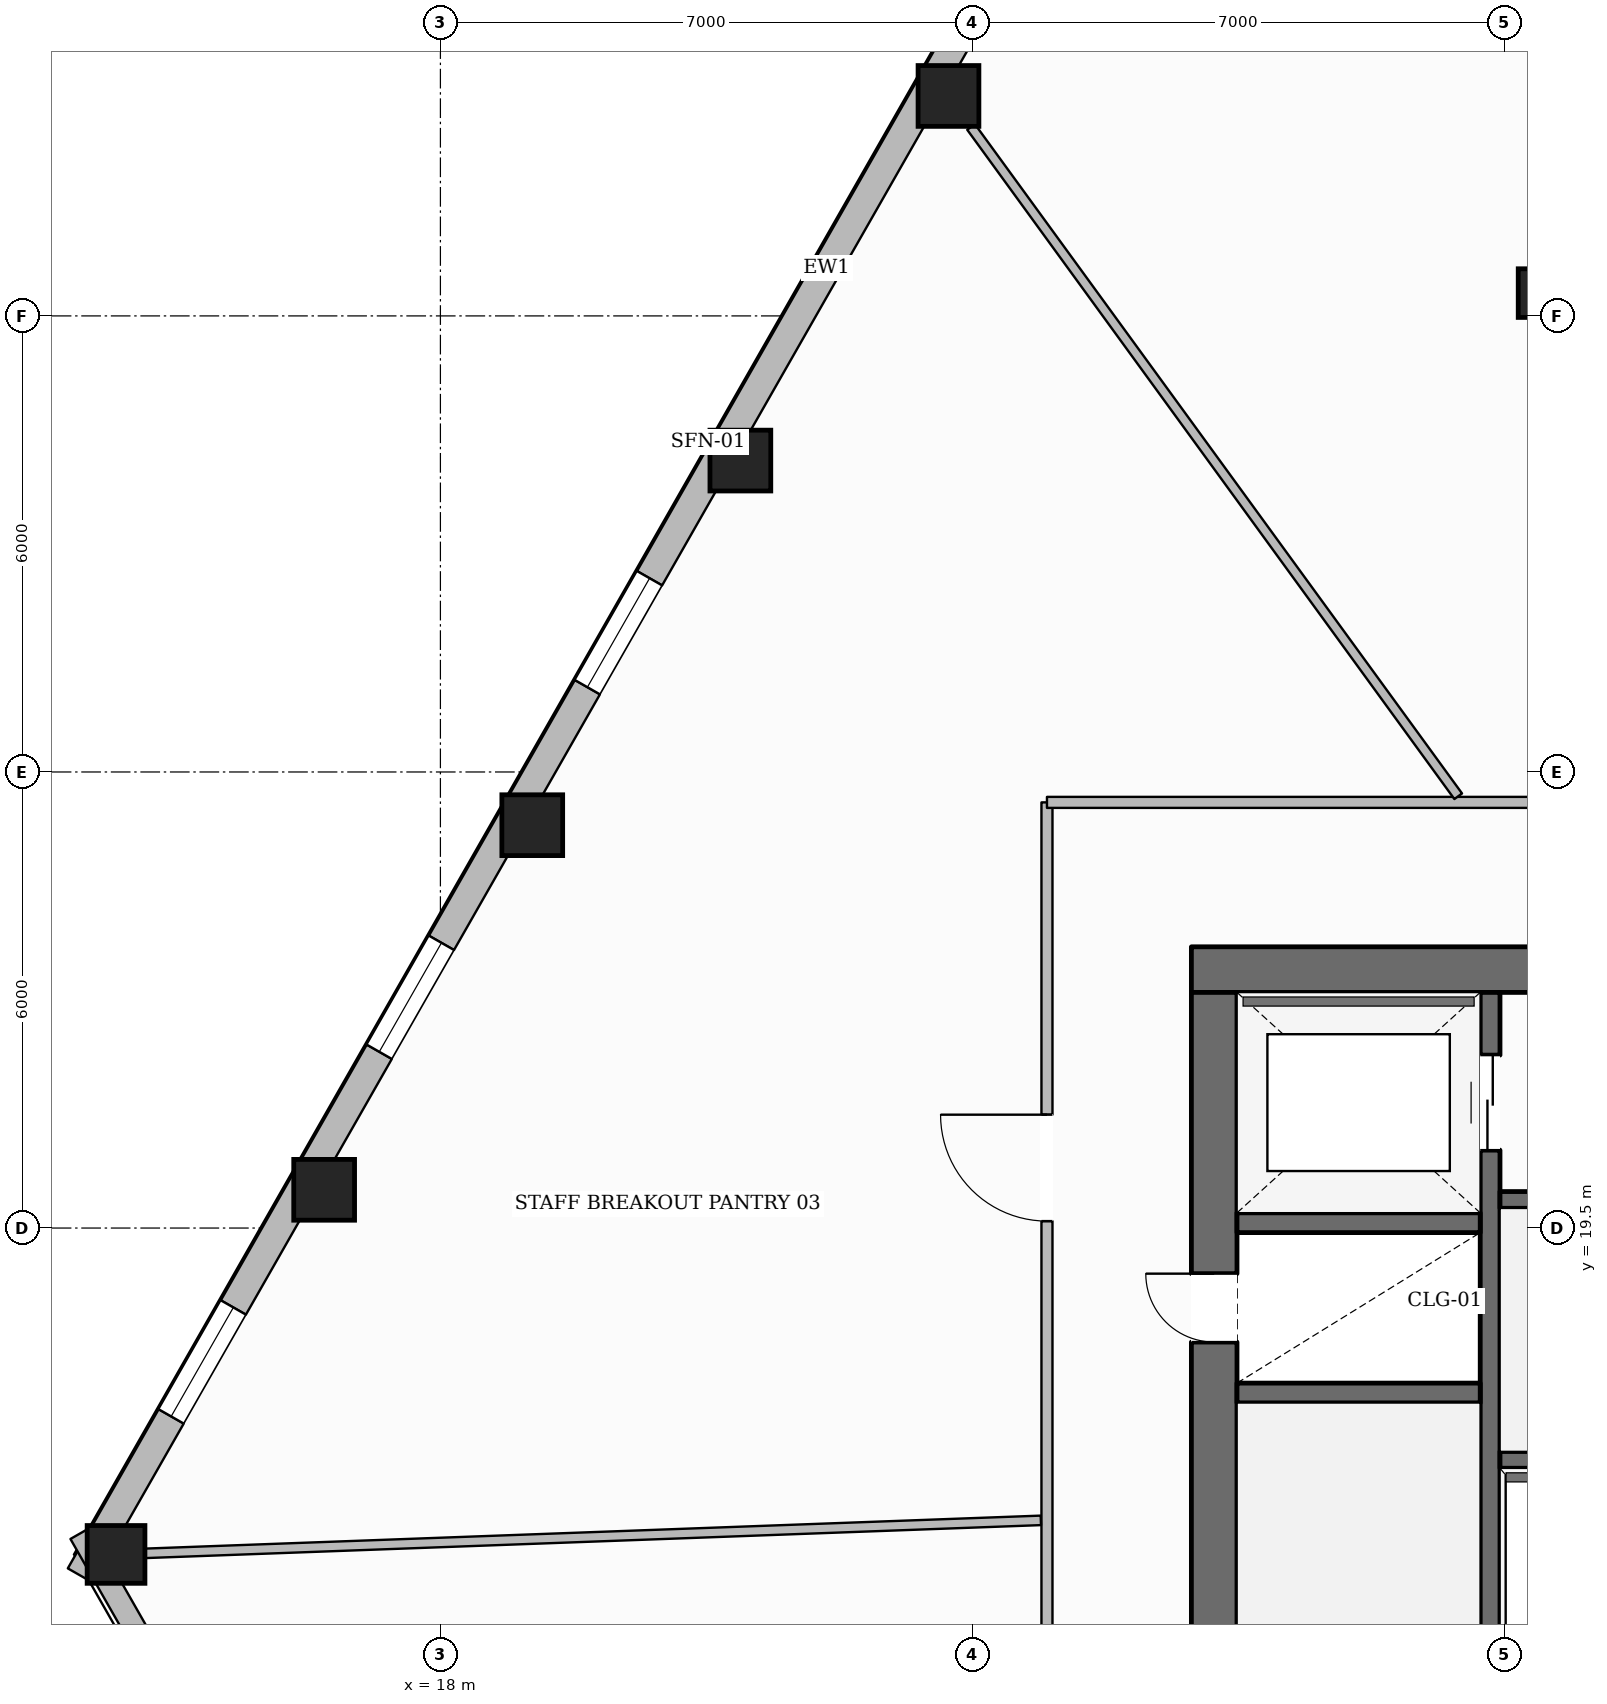
"""IFC4 building model, lengths in metres.
Left out: names, types, materials, properties, quantities, classifications, styles, units other than length and angle.
Written with IfcOpenShell. Run it as: python <this file> out.ifc"""

import sys

from ifc_helpers import new_model, si_unit, direction, frame, frame_2d, origin, origin_2d, place, context, subcontext, project, spatial, rectangle, hollow_rectangle, extrude, element, fill, save


model = new_model("IFC4")
c1 = context("Model", 3, precision=1e-05, world=origin(), true_north=direction((0.0, 1.0)))
c2 = subcontext(c1, "Body", "Model", "MODEL_VIEW")
j1 = project(units=[si_unit("LENGTHUNIT", "METRE"), si_unit("PLANEANGLEUNIT", "RADIAN")], contexts=[c1])
p1 = place(None, origin())
s1 = spatial("IfcSite", under=j1, at=p1, CompositionType="ELEMENT")
p2 = place(p1, origin())
s2 = spatial("IfcBuilding", under=s1, at=p2, CompositionType="ELEMENT")
p3 = place(p2, frame((0.0, 0.0, 25.25)))
s3 = spatial("IfcBuildingStorey", under=s2, at=p3, CompositionType="ELEMENT", Elevation=25.25)
p4 = place(p3, frame((27.88, 22.9, 0.0), z_axis=(0.0, 0.0, 1.0), x_axis=(1.0, 0.0, 0.0)))
e1 = element("IfcWall", 1, at=p4, inside=s3, PredefinedType="SOLIDWALL", context=c2, shape_type="SweptSolid", body=[
    extrude(rectangle(XDim=20.24, YDim=0.6, at=frame_2d((10.12, 0.0))), origin(), (0.0, 0.0, 1.0), 3.59),
])
p5 = place(p4, frame((6.395, 0.0, 0.0)))
e2 = element("IfcOpeningElement", 2, at=p5, cuts=e1, PredefinedType="OPENING", context=c2, shape_type="SweptSolid", body=[
    extrude(rectangle(XDim=1.05, YDim=2.15, at=frame_2d((0.525, 1.075))), frame((0.0, 0.31, 0.0), z_axis=(0.0, -1.0, 0.0), x_axis=(1.0, 0.0, 0.0)), (0.0, 0.0, 1.0), 0.62),
])
p6 = place(p4, frame((12.795, 0.0, 0.0)))
e3 = element("IfcOpeningElement", 3, at=p6, cuts=e1, PredefinedType="OPENING", context=c2, shape_type="SweptSolid", body=[
    extrude(rectangle(XDim=1.05, YDim=2.15, at=frame_2d((0.525, 1.075))), frame((0.0, 0.31, 0.0), z_axis=(0.0, -1.0, 0.0), x_axis=(1.0, 0.0, 0.0)), (0.0, 0.0, 1.0), 0.62),
])
p7 = place(p3, frame((28.18, 9.6, 0.0), z_axis=(0.0, 0.0, 1.0), x_axis=(0.0, 1.0, 0.0)))
e4 = element("IfcWall", 4, at=p7, inside=s3, PredefinedType="SOLIDWALL", context=c2, shape_type="SweptSolid", body=[
    extrude(rectangle(XDim=13.0, YDim=0.6, at=frame_2d((6.5, 0.0))), origin(), (0.0, 0.0, 1.0), 3.59),
])
p8 = place(p7, frame((0.2, 0.0, 0.0)))
e5 = element("IfcOpeningElement", 5, at=p8, cuts=e4, PredefinedType="OPENING", context=c2, shape_type="SweptSolid", body=[
    extrude(rectangle(XDim=1.1, YDim=2.15, at=frame_2d((0.55, 1.075))), frame((0.0, 0.31, 0.0), z_axis=(0.0, -1.0, 0.0), x_axis=(1.0, 0.0, 0.0)), (0.0, 0.0, 1.0), 0.62),
])
p9 = place(p7, frame((8.4, 0.0, 0.0)))
e6 = element("IfcOpeningElement", 6, at=p9, cuts=e4, PredefinedType="OPENING", context=c2, shape_type="SweptSolid", body=[
    extrude(rectangle(XDim=0.9, YDim=2.1, at=frame_2d((0.45, 1.05))), frame((0.0, 0.31, 0.0), z_axis=(0.0, -1.0, 0.0), x_axis=(1.0, 0.0, 0.0)), (0.0, 0.0, 1.0), 0.62),
])
p10 = place(p3, frame((31.81, 9.6, 0.0), z_axis=(0.0, 0.0, 1.0), x_axis=(0.0, 1.0, 0.0)))
e7 = element("IfcWall", 7, at=p10, inside=s3, PredefinedType="SHEAR", context=c2, shape_type="SweptSolid", body=[
    extrude(rectangle(XDim=13.0, YDim=0.26, at=frame_2d((6.5, 0.0))), origin(), (0.0, 0.0, 1.0), 3.59),
])
p11 = place(p10, frame((10.925, 0.0, 0.0)))
e8 = element("IfcOpeningElement", 8, at=p11, cuts=e7, PredefinedType="OPENING", context=c2, shape_type="SweptSolid", body=[
    extrude(rectangle(XDim=1.25, YDim=2.25, at=frame_2d((0.625, 1.125))), frame((0.0, 0.14, 0.0), z_axis=(0.0, -1.0, 0.0), x_axis=(1.0, 0.0, 0.0)), (0.0, 0.0, 1.0), 0.28),
])
for number, where, z_axis, x_axis in (
    (9, (28.48, 17.33, 0.0), (0.0, 0.0, 1.0), (1.0, 0.0, 0.0)),
    (10, (28.48, 19.57, 0.0), (0.0, 0.0, 1.0), (1.0, 0.0, 0.0)),
):
    element("IfcWall", number, at=place(p3, frame(where, z_axis=z_axis, x_axis=x_axis)), inside=s3, PredefinedType="SHEAR", context=c2, shape_type="SweptSolid", body=[
        extrude(rectangle(XDim=3.2, YDim=0.26, at=frame_2d((1.6, 0.0))), origin(), (0.0, 0.0, 1.0), 3.59),
    ])
p12 = place(p3, frame((31.94, 19.87, 0.0), z_axis=(0.0, 0.0, 1.0), x_axis=(1.0, 0.0, 0.0)))
e11 = element("IfcWall", 11, at=p12, inside=s3, PredefinedType="SOLIDWALL", context=c2, shape_type="SweptSolid", body=[
    extrude(rectangle(XDim=12.12, YDim=0.22, at=frame_2d((6.06, 0.0))), origin(), (0.0, 0.0, 1.0), 3.59),
])
p13 = place(p12, frame((6.3, 0.0, 0.0)))
e12 = element("IfcOpeningElement", 12, at=p13, cuts=e11, PredefinedType="OPENING", context=c2, shape_type="SweptSolid", body=[
    extrude(rectangle(XDim=1.1, YDim=2.15, at=frame_2d((0.55, 1.075))), frame((0.0, 0.12, 0.0), z_axis=(0.0, -1.0, 0.0), x_axis=(1.0, 0.0, 0.0)), (0.0, 0.0, 1.0), 0.24),
])
p14 = place(p12, frame((9.51, 0.0, 0.0)))
e13 = element("IfcOpeningElement", 13, at=p14, cuts=e11, PredefinedType="OPENING", context=c2, shape_type="SweptSolid", body=[
    extrude(rectangle(XDim=0.9, YDim=2.1, at=frame_2d((0.45, 1.05))), frame((0.0, 0.12, 0.0), z_axis=(0.0, -1.0, 0.0), x_axis=(1.0, 0.0, 0.0)), (0.0, 0.0, 1.0), 0.24),
])
p15 = place(p3, frame((31.94, 16.45, 0.0), z_axis=(0.0, 0.0, 1.0), x_axis=(1.0, 0.0, 0.0)))
e14 = element("IfcWall", 14, at=p15, inside=s3, PredefinedType="SOLIDWALL", context=c2, shape_type="SweptSolid", body=[
    extrude(rectangle(XDim=12.12, YDim=0.22, at=frame_2d((6.06, 0.0))), origin(), (0.0, 0.0, 1.0), 3.59),
])
for number, where, z_axis, x_axis in (
    (15, (24.684, 34.394, 0.0), (0.0, 0.0, 1.0), (1.0, 0.0, 0.0)),
    (16, (21.946, 29.597, 0.0), (0.0, 0.0, 1.0), (1.0, 0.0, 0.0)),
    (17, (19.208, 24.8, 0.0), (0.0, 0.0, 1.0), (1.0, 0.0, 0.0)),
    (18, (16.47, 20.003, 0.0), (0.0, 0.0, 1.0), (1.0, 0.0, 0.0)),
):
    element("IfcColumn", number, at=place(p3, frame(where, z_axis=z_axis, x_axis=x_axis)), inside=s3, PredefinedType="COLUMN", context=c2, shape_type="SweptSolid", body=[
        extrude(hollow_rectangle(XDim=0.8, YDim=0.8, WallThickness=0.036, at=origin_2d()), origin(), (0.0, 0.0, 1.0), 3.59),
    ])
p16 = place(p3, frame((13.733, 15.206, 0.0), z_axis=(0.0, 0.0, 1.0), x_axis=(1.0, 0.0, 0.0)))
e19 = element("IfcColumn", 19, at=p16, inside=s3, PredefinedType="COLUMN", context=c2, shape_type="SweptSolid", body=[
    extrude(hollow_rectangle(XDim=0.76, YDim=0.76, WallThickness=0.035, at=origin_2d()), origin(), (0.0, 0.0, 1.0), 3.59),
])
p17 = place(p3, frame((32.5, 31.8, 0.0), z_axis=(0.0, 0.0, 1.0), x_axis=(1.0, 0.0, 0.0)))
e20 = element("IfcColumn", 20, at=p17, inside=s3, PredefinedType="COLUMN", context=c2, shape_type="SweptSolid", body=[
    extrude(hollow_rectangle(XDim=0.64, YDim=0.64, WallThickness=0.028, at=origin_2d()), origin(), (0.0, 0.0, 1.0), 3.59),
])
p18 = place(p3, frame((13.263, 14.928, 0.0), z_axis=(0.0, 0.0, 1.0), x_axis=(0.495711630902, 0.868487178367, 0.0)))
e21 = element("IfcWall", 21, at=p18, inside=s3, PredefinedType="STANDARD", context=c2, shape_type="SweptSolid", body=[
    extrude(rectangle(XDim=34.092, YDim=0.38, at=frame_2d((17.046, 0.0))), origin(), (0.0, 0.0, 1.0), 2.97),
])
p19 = place(p18, frame((30.027, 0.0, 0.65)))
e22 = element("IfcOpeningElement", 22, at=p19, cuts=e21, PredefinedType="OPENING", context=c2, shape_type="SweptSolid", body=[
    extrude(rectangle(XDim=1.65, YDim=1.75, at=frame_2d((0.825, 0.875))), frame((0.0, 0.2, 0.0), z_axis=(0.0, -1.0, 0.0), x_axis=(1.0, 0.0, 0.0)), (0.0, 0.0, 1.0), 0.4),
])
p20 = place(p18, frame((24.504, 0.0, 0.65)))
e23 = element("IfcOpeningElement", 23, at=p20, cuts=e21, PredefinedType="OPENING", context=c2, shape_type="SweptSolid", body=[
    extrude(rectangle(XDim=1.65, YDim=1.75, at=frame_2d((0.825, 0.875))), frame((0.0, 0.2, 0.0), z_axis=(0.0, -1.0, 0.0), x_axis=(1.0, 0.0, 0.0)), (0.0, 0.0, 1.0), 0.4),
])
p21 = place(p18, frame((13.457, 0.0, 0.65)))
e24 = element("IfcOpeningElement", 24, at=p21, cuts=e21, PredefinedType="OPENING", context=c2, shape_type="SweptSolid", body=[
    extrude(rectangle(XDim=1.65, YDim=1.75, at=frame_2d((0.825, 0.875))), frame((0.0, 0.2, 0.0), z_axis=(0.0, -1.0, 0.0), x_axis=(1.0, 0.0, 0.0)), (0.0, 0.0, 1.0), 0.4),
])
p22 = place(p18, frame((7.934, 0.0, 0.65)))
e25 = element("IfcOpeningElement", 25, at=p22, cuts=e21, PredefinedType="OPENING", context=c2, shape_type="SweptSolid", body=[
    extrude(rectangle(XDim=1.65, YDim=1.75, at=frame_2d((0.825, 0.875))), frame((0.0, 0.2, 0.0), z_axis=(0.0, -1.0, 0.0), x_axis=(1.0, 0.0, 0.0)), (0.0, 0.0, 1.0), 0.4),
])
p23 = place(p18, frame((2.411, 0.0, 0.65)))
e26 = element("IfcOpeningElement", 26, at=p23, cuts=e21, PredefinedType="OPENING", context=c2, shape_type="SweptSolid", body=[
    extrude(rectangle(XDim=1.65, YDim=1.75, at=frame_2d((0.825, 0.875))), frame((0.0, 0.2, 0.0), z_axis=(0.0, -1.0, 0.0), x_axis=(1.0, 0.0, 0.0)), (0.0, 0.0, 1.0), 0.4),
])
p24 = place(p3, frame((21.58, 0.913, 0.0), z_axis=(0.0, 0.0, 1.0), x_axis=(-0.495706340457, 0.868490198005, 0.0)))
e27 = element("IfcWall", 27, at=p24, inside=s3, PredefinedType="STANDARD", context=c2, shape_type="SweptSolid", body=[
    extrude(rectangle(XDim=16.777, YDim=0.3, at=frame_2d((8.388, 0.0))), origin(), (0.0, 0.0, 1.0), 2.97),
])
p25 = place(p24, frame((7.789, 0.0, 0.65)))
e28 = element("IfcOpeningElement", 28, at=p25, cuts=e27, PredefinedType="OPENING", context=c2, shape_type="SweptSolid", body=[
    extrude(rectangle(XDim=1.2, YDim=1.7, at=frame_2d((0.6, 0.85))), frame((0.0, 0.16, 0.0), z_axis=(0.0, -1.0, 0.0), x_axis=(1.0, 0.0, 0.0)), (0.0, 0.0, 1.0), 0.32),
])
p26 = place(p3, frame((25.98, 9.1, 0.0), z_axis=(0.0, 0.0, 1.0), x_axis=(0.0, 1.0, 0.0)))
e29 = element("IfcWall", 29, at=p26, inside=s3, PredefinedType="PARTITIONING", context=c2, shape_type="SweptSolid", body=[
    extrude(rectangle(XDim=16.0, YDim=0.145, at=frame_2d((8.0, 0.0))), origin(), (0.0, 0.0, 1.0), 3.278),
])
p27 = place(p26, frame((10.491, 0.0, 0.0)))
e30 = element("IfcOpeningElement", 30, at=p27, cuts=e29, PredefinedType="OPENING", context=c2, shape_type="SweptSolid", body=[
    extrude(rectangle(XDim=1.4, YDim=2.2, at=frame_2d((0.7, 1.1))), frame((0.0, 0.083, 0.0), z_axis=(0.0, -1.0, 0.0), x_axis=(1.0, 0.0, 0.0)), (0.0, 0.0, 1.0), 0.165),
])
p28 = place(p26, frame((2.663, 0.0, 0.0)))
e31 = element("IfcOpeningElement", 31, at=p28, cuts=e29, PredefinedType="OPENING", context=c2, shape_type="SweptSolid", body=[
    extrude(rectangle(XDim=1.4, YDim=2.2, at=frame_2d((0.7, 1.1))), frame((0.0, 0.083, 0.0), z_axis=(0.0, -1.0, 0.0), x_axis=(1.0, 0.0, 0.0)), (0.0, 0.0, 1.0), 0.165),
])
p29 = place(p3, frame((25.98, 25.1, 0.0), z_axis=(0.0, 0.0, 1.0), x_axis=(1.0, 0.0, 0.0)))
e32 = element("IfcWall", 32, at=p29, inside=s3, PredefinedType="PARTITIONING", context=c2, shape_type="SweptSolid", body=[
    extrude(rectangle(XDim=11.02, YDim=0.145, at=frame_2d((5.51, 0.0))), origin(), (0.0, 0.0, 1.0), 3.59),
])
p30 = place(p3, frame((31.39, 25.18, 0.0), z_axis=(0.0, 0.0, 1.0), x_axis=(-0.588482227792, 0.808510153043, 0.0)))
e33 = element("IfcWall", 33, at=p30, inside=s3, PredefinedType="PARTITIONING", context=c2, shape_type="SweptSolid", body=[
    extrude(rectangle(XDim=10.891, YDim=0.125, at=frame_2d((5.445, 0.0))), origin(), (0.0, 0.0, 1.0), 3.057),
])
p31 = place(p3, frame((25.899, 15.654, 0.0), z_axis=(0.0, 0.0, 1.0), x_axis=(-0.999322388706, -0.036807111154, 0.0)))
e34 = element("IfcWall", 34, at=p31, inside=s3, PredefinedType="PARTITIONING", context=c2, shape_type="SweptSolid", body=[
    extrude(rectangle(XDim=11.787, YDim=0.125, at=frame_2d((5.894, 0.0))), origin(), (0.0, 0.0, 1.0), 3.057),
])
p32 = place(p21, origin())
e35 = element("IfcWindow", 35, at=p32, inside=s3, PartitioningType="SINGLE_PANEL", PredefinedType="WINDOW", context=c2, shape_type="SweptSolid", body=[
    extrude(rectangle(XDim=1.65, YDim=1.75, at=frame_2d((0.825, 0.875))), frame((0.0, 0.03, 0.0), z_axis=(0.0, -1.0, 0.0), x_axis=(1.0, 0.0, 0.0)), (0.0, 0.0, 1.0), 0.06),
])
fill(e24, e35)
p33 = place(p22, origin())
e36 = element("IfcWindow", 36, at=p33, inside=s3, PartitioningType="SINGLE_PANEL", PredefinedType="WINDOW", context=c2, shape_type="SweptSolid", body=[
    extrude(rectangle(XDim=1.65, YDim=1.75, at=frame_2d((0.825, 0.875))), frame((0.0, 0.03, 0.0), z_axis=(0.0, -1.0, 0.0), x_axis=(1.0, 0.0, 0.0)), (0.0, 0.0, 1.0), 0.06),
])
fill(e25, e36)
p34 = place(p23, origin())
e37 = element("IfcWindow", 37, at=p34, inside=s3, PartitioningType="SINGLE_PANEL", PredefinedType="WINDOW", context=c2, shape_type="SweptSolid", body=[
    extrude(rectangle(XDim=1.65, YDim=1.75, at=frame_2d((0.825, 0.875))), frame((0.0, 0.03, 0.0), z_axis=(0.0, -1.0, 0.0), x_axis=(1.0, 0.0, 0.0)), (0.0, 0.0, 1.0), 0.06),
])
fill(e26, e37)
p35 = place(p9, origin())
e38 = element("IfcDoor", 38, at=p35, inside=s3, OperationType="SINGLE_SWING_RIGHT", PredefinedType="DOOR", context=c2, shape_type="SweptSolid", body=[
    extrude(rectangle(XDim=0.9, YDim=2.1, at=frame_2d((0.45, 1.05))), frame((0.0, 0.025, 0.0), z_axis=(0.0, -1.0, 0.0), x_axis=(1.0, 0.0, 0.0)), (0.0, 0.0, 1.0), 0.05),
])
fill(e6, e38)
p36 = place(p11, origin())
e39 = element("IfcDoor", 39, at=p36, inside=s3, OperationType="DOUBLE_DOOR_SLIDING", PredefinedType="DOOR", context=c2, shape_type="SweptSolid", body=[
    extrude(rectangle(XDim=1.25, YDim=2.25, at=frame_2d((0.625, 1.125))), frame((0.0, 0.025, 0.0), z_axis=(0.0, -1.0, 0.0), x_axis=(1.0, 0.0, 0.0)), (0.0, 0.0, 1.0), 0.05),
])
fill(e8, e39)
p37 = place(p27, origin())
e40 = element("IfcDoor", 40, at=p37, inside=s3, OperationType="SINGLE_SWING_RIGHT", PredefinedType="DOOR", context=c2, shape_type="SweptSolid", body=[
    extrude(rectangle(XDim=1.4, YDim=2.2, at=frame_2d((0.7, 1.1))), frame((0.0, 0.025, 0.0), z_axis=(0.0, -1.0, 0.0), x_axis=(1.0, 0.0, 0.0)), (0.0, 0.0, 1.0), 0.05),
])
fill(e30, e40)
save(model, sys.argv[1])
